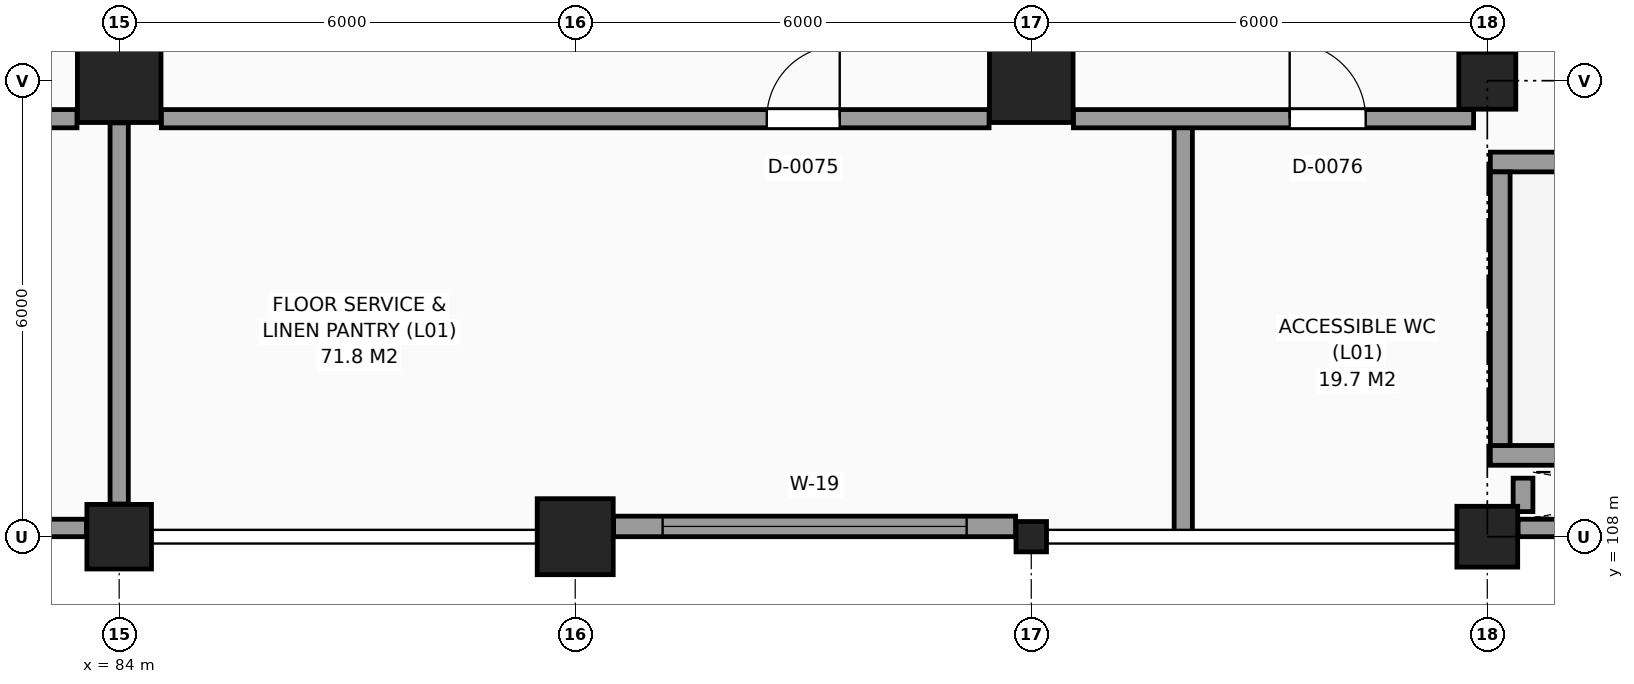
"""IFC4 building model, lengths in metres.
Left out: names, types, materials, properties, quantities, classifications, styles, units other than length and angle.
Written with IfcOpenShell. Run it as: python <this file> out.ifc"""

import sys

from ifc_helpers import new_model, si_unit, direction, frame, frame_2d, origin, origin_2d, place, context, subcontext, project, spatial, rectangle, circle, i_section, extrude, element, fill, save


model = new_model("IFC4")
c1 = context("Model", 3, precision=1e-05, world=origin(), true_north=direction((0.0, 1.0)))
c2 = subcontext(c1, "Body", "Model", "MODEL_VIEW")
j1 = project(units=[si_unit("LENGTHUNIT", "METRE"), si_unit("PLANEANGLEUNIT", "RADIAN")], contexts=[c1])
p1 = place(None, origin())
s1 = spatial("IfcSite", under=j1, at=p1, CompositionType="ELEMENT")
p2 = place(p1, origin())
s2 = spatial("IfcBuilding", under=s1, at=p2, CompositionType="ELEMENT")
p3 = place(p2, frame((0.0, 0.0, 6.0)))
s3 = spatial("IfcBuildingStorey", under=s2, at=p3, CompositionType="ELEMENT", Elevation=6.0)
p4 = place(p3, frame((84.0, 108.0, 0.0), z_axis=(0.0, 0.0, 1.0), x_axis=(1.0, 0.0, 0.0)))
e1 = element("IfcColumn", 1, at=p4, inside=s3, PredefinedType="COLUMN", context=c2, shape_type="SweptSolid", body=[
    extrude(circle(Radius=0.425, at=origin_2d()), origin(), (0.0, 0.0, 1.0), 4.5),
])
p5 = place(p3, frame((84.0, 114.0, 0.0), z_axis=(0.0, 0.0, 1.0), x_axis=(1.0, 0.0, 0.0)))
e2 = element("IfcColumn", 2, at=p5, inside=s3, PredefinedType="COLUMN", context=c2, shape_type="SweptSolid", body=[
    extrude(rectangle(XDim=1.1, YDim=1.1, at=origin_2d()), origin(), (0.0, 0.0, 1.0), 4.5),
])
p6 = place(p3, frame((90.0, 108.0, 0.0), z_axis=(0.0, 0.0, 1.0), x_axis=(1.0, 0.0, 0.0)))
e3 = element("IfcColumn", 3, at=p6, inside=s3, PredefinedType="COLUMN", context=c2, shape_type="SweptSolid", body=[
    extrude(circle(Radius=0.5, at=origin_2d()), origin(), (0.0, 0.0, 1.0), 4.5),
])
p7 = place(p3, frame((96.0, 108.0, 0.0), z_axis=(0.0, 0.0, 1.0), x_axis=(1.0, 0.0, 0.0)))
e4 = element("IfcColumn", 4, at=p7, inside=s3, PredefinedType="COLUMN", context=c2, shape_type="SweptSolid", body=[
    extrude(i_section(OverallWidth=0.401, OverallDepth=0.399, WebThickness=0.019, FlangeThickness=0.03, FilletRadius=0.015, at=origin_2d()), origin(), (0.0, 0.0, 1.0), 4.5),
])
p8 = place(p3, frame((96.0, 114.0, 0.0), z_axis=(0.0, 0.0, 1.0), x_axis=(1.0, 0.0, 0.0)))
e5 = element("IfcColumn", 5, at=p8, inside=s3, PredefinedType="COLUMN", context=c2, shape_type="SweptSolid", body=[
    extrude(rectangle(XDim=1.1, YDim=1.1, at=origin_2d()), origin(), (0.0, 0.0, 1.0), 4.5),
])
p9 = place(p3, frame((102.0, 108.0, 0.0), z_axis=(0.0, 0.0, 1.0), x_axis=(1.0, 0.0, 0.0)))
e6 = element("IfcColumn", 6, at=p9, inside=s3, PredefinedType="COLUMN", context=c2, shape_type="SweptSolid", body=[
    extrude(rectangle(XDim=0.8, YDim=0.8, at=origin_2d()), origin(), (0.0, 0.0, 1.0), 4.5),
])
p10 = place(p3, frame((102.0, 114.0, 0.0), z_axis=(0.0, 0.0, 1.0), x_axis=(1.0, 0.0, 0.0)))
e7 = element("IfcColumn", 7, at=p10, inside=s3, PredefinedType="COLUMN", context=c2, shape_type="SweptSolid", body=[
    extrude(rectangle(XDim=0.75, YDim=0.75, at=origin_2d()), origin(), (0.0, 0.0, 1.0), 4.5),
])
p11 = place(p3, frame((78.38, 108.115, 0.0), z_axis=(0.0, 0.0, 1.0), x_axis=(1.0, 0.0, 0.0)))
e8 = element("IfcWall", 8, at=p11, inside=s3, PredefinedType="SOLIDWALL", context=c2, shape_type="SweptSolid", body=[
    extrude(rectangle(XDim=5.19, YDim=0.23, at=frame_2d((2.595, 0.0))), origin(), (0.0, 0.0, 1.0), 3.47),
])
p12 = place(p3, frame((90.505, 108.135, 0.0), z_axis=(0.0, 0.0, 1.0), x_axis=(1.0, 0.0, 0.0)))
e9 = element("IfcWall", 9, at=p12, inside=s3, PredefinedType="SOLIDWALL", context=c2, shape_type="SweptSolid", body=[
    extrude(rectangle(XDim=5.29, YDim=0.27, at=frame_2d((2.645, 0.0))), origin(), (0.0, 0.0, 1.0), 3.47),
])
p13 = place(p12, frame((0.645, 0.0, 0.85)))
e10 = element("IfcOpeningElement", 10, at=p13, cuts=e9, PredefinedType="OPENING", context=c2, shape_type="SweptSolid", body=[
    extrude(rectangle(XDim=4.0, YDim=1.3, at=frame_2d((2.0, 0.65))), frame((0.0, 0.145, 0.0), z_axis=(0.0, -1.0, 0.0), x_axis=(1.0, 0.0, 0.0)), (0.0, 0.0, 1.0), 0.29),
])
p14 = place(p3, frame((102.405, 108.115, 0.0), z_axis=(0.0, 0.0, 1.0), x_axis=(1.0, 0.0, 0.0)))
e11 = element("IfcWall", 11, at=p14, inside=s3, PredefinedType="SOLIDWALL", context=c2, shape_type="SweptSolid", body=[
    extrude(rectangle(XDim=5.215, YDim=0.23, at=frame_2d((2.607, 0.0))), origin(), (0.0, 0.0, 1.0), 4.22),
])
for number, where, z_axis, x_axis in (
    (12, (102.04, 109.07, 0.0), (0.0, 0.0, 1.0), (1.0, 0.0, 0.0)),
    (13, (102.04, 112.93, 0.0), (0.0, 0.0, 1.0), (1.0, 0.0, 0.0)),
):
    element("IfcWall", number, at=place(p3, frame(where, z_axis=z_axis, x_axis=x_axis)), inside=s3, PredefinedType="SHEAR", context=c2, shape_type="SweptSolid", body=[
        extrude(rectangle(XDim=10.72, YDim=0.26, at=frame_2d((5.36, 0.0))), origin(), (0.0, 0.0, 1.0), 4.5),
    ])
p15 = place(p3, frame((102.17, 109.2, 0.0), z_axis=(0.0, 0.0, 1.0), x_axis=(0.0, 1.0, 0.0)))
e14 = element("IfcWall", 14, at=p15, inside=s3, PredefinedType="SHEAR", context=c2, shape_type="SweptSolid", body=[
    extrude(rectangle(XDim=3.6, YDim=0.26, at=frame_2d((1.8, 0.0))), origin(), (0.0, 0.0, 1.0), 4.5),
])
p16 = place(p3, frame((102.47, 108.33, 0.0), z_axis=(0.0, 0.0, 1.0), x_axis=(0.0, 1.0, 0.0)))
e15 = element("IfcWall", 15, at=p16, inside=s3, PredefinedType="SHEAR", context=c2, shape_type="SweptSolid", body=[
    extrude(rectangle(XDim=0.44, YDim=0.26, at=frame_2d((0.22, 0.0))), origin(), (0.0, 0.0, 1.0), 4.5),
])
p17 = place(p3, frame((84.0, 108.43, 0.0), z_axis=(0.0, 0.0, 1.0), x_axis=(0.0, 1.0, 0.0)))
e16 = element("IfcWall", 16, at=p17, inside=s3, PredefinedType="PARTITIONING", context=c2, shape_type="SweptSolid", body=[
    extrude(rectangle(XDim=5.015, YDim=0.24, at=frame_2d((2.508, 0.0))), origin(), (0.0, 0.0, 1.0), 3.42),
])
p18 = place(p3, frame((98.0, 108.045, 0.0), z_axis=(0.0, 0.0, 1.0), x_axis=(0.0, 1.0, 0.0)))
e17 = element("IfcWall", 17, at=p18, inside=s3, PredefinedType="PARTITIONING", context=c2, shape_type="SweptSolid", body=[
    extrude(rectangle(XDim=5.455, YDim=0.24, at=frame_2d((2.728, 0.0))), origin(), (0.0, 0.0, 1.0), 4.22),
])
p19 = place(p3, frame((76.75, 113.5, 0.0), z_axis=(0.0, 0.0, 1.0), x_axis=(1.0, 0.0, 0.0)))
e18 = element("IfcWall", 18, at=p19, inside=s3, PredefinedType="PARTITIONING", context=c2, shape_type="SweptSolid", body=[
    extrude(rectangle(XDim=6.695, YDim=0.24, at=frame_2d((3.348, 0.0))), origin(), (0.0, 0.0, 1.0), 4.22),
])
p20 = place(p19, frame((3.25, 0.0, 0.0)))
e19 = element("IfcOpeningElement", 19, at=p20, cuts=e18, PredefinedType="OPENING", context=c2, shape_type="SweptSolid", body=[
    extrude(rectangle(XDim=1.1, YDim=2.15, at=frame_2d((0.55, 1.075))), frame((0.0, 0.13, 0.0), z_axis=(0.0, -1.0, 0.0), x_axis=(1.0, 0.0, 0.0)), (0.0, 0.0, 1.0), 0.26),
])
p21 = place(p3, frame((84.555, 113.5, 0.0), z_axis=(0.0, 0.0, 1.0), x_axis=(1.0, 0.0, 0.0)))
e20 = element("IfcWall", 20, at=p21, inside=s3, PredefinedType="PARTITIONING", context=c2, shape_type="SweptSolid", body=[
    extrude(rectangle(XDim=10.89, YDim=0.24, at=frame_2d((5.445, 0.0))), origin(), (0.0, 0.0, 1.0), 4.22),
])
p22 = place(p21, frame((7.965, 0.0, 0.0)))
e21 = element("IfcOpeningElement", 21, at=p22, cuts=e20, PredefinedType="OPENING", context=c2, shape_type="SweptSolid", body=[
    extrude(rectangle(XDim=0.96, YDim=2.15, at=frame_2d((0.48, 1.075))), frame((0.0, 0.13, 0.0), z_axis=(0.0, -1.0, 0.0), x_axis=(1.0, 0.0, 0.0)), (0.0, 0.0, 1.0), 0.26),
])
p23 = place(p3, frame((96.555, 113.5, 0.0), z_axis=(0.0, 0.0, 1.0), x_axis=(1.0, 0.0, 0.0)))
e22 = element("IfcWall", 22, at=p23, inside=s3, PredefinedType="PARTITIONING", context=c2, shape_type="SweptSolid", body=[
    extrude(rectangle(XDim=5.265, YDim=0.24, at=frame_2d((2.633, 0.0))), origin(), (0.0, 0.0, 1.0), 4.22),
])
p24 = place(p23, frame((2.845, 0.0, 0.0)))
e23 = element("IfcOpeningElement", 23, at=p24, cuts=e22, PredefinedType="OPENING", context=c2, shape_type="SweptSolid", body=[
    extrude(rectangle(XDim=1.0, YDim=2.15, at=frame_2d((0.5, 1.075))), frame((0.0, 0.13, 0.0), z_axis=(0.0, -1.0, 0.0), x_axis=(1.0, 0.0, 0.0)), (0.0, 0.0, 1.0), 0.26),
])
p25 = place(p13, origin())
e24 = element("IfcWindow", 24, at=p25, inside=s3, PartitioningType="SINGLE_PANEL", PredefinedType="WINDOW", context=c2, shape_type="SweptSolid", body=[
    extrude(rectangle(XDim=4.0, YDim=1.3, at=frame_2d((2.0, 0.65))), frame((0.0, 0.03, 0.0), z_axis=(0.0, -1.0, 0.0), x_axis=(1.0, 0.0, 0.0)), (0.0, 0.0, 1.0), 0.06),
])
fill(e10, e24)
p26 = place(p22, origin())
e25 = element("IfcDoor", 25, at=p26, inside=s3, OperationType="SINGLE_SWING_RIGHT", PredefinedType="DOOR", context=c2, shape_type="SweptSolid", body=[
    extrude(rectangle(XDim=0.96, YDim=2.15, at=frame_2d((0.48, 1.075))), frame((0.0, 0.025, 0.0), z_axis=(0.0, -1.0, 0.0), x_axis=(1.0, 0.0, 0.0)), (0.0, 0.0, 1.0), 0.05),
])
fill(e21, e25)
p27 = place(p24, origin())
e26 = element("IfcDoor", 26, at=p27, inside=s3, OperationType="SINGLE_SWING_LEFT", PredefinedType="DOOR", context=c2, shape_type="SweptSolid", body=[
    extrude(rectangle(XDim=1.0, YDim=2.15, at=frame_2d((0.5, 1.075))), frame((0.0, 0.025, 0.0), z_axis=(0.0, -1.0, 0.0), x_axis=(1.0, 0.0, 0.0)), (0.0, 0.0, 1.0), 0.05),
])
fill(e23, e26)
save(model, sys.argv[1])
